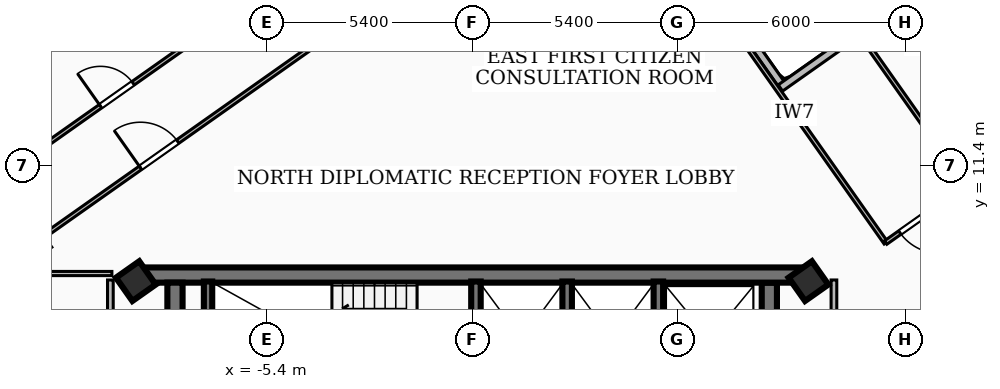
"""IFC4 building model, lengths in metres.
Left out: names, types, materials, properties, quantities, classifications, styles, units other than length and angle.
Written with IfcOpenShell. Run it as: python <this file> out.ifc"""

import sys

from ifc_helpers import new_model, si_unit, direction, frame, frame_2d, origin, origin_2d, place, context, subcontext, project, spatial, rectangle, extrude, element, fill, save


model = new_model("IFC4")
c1 = context("Model", 3, precision=1e-05, world=origin(), true_north=direction((0.0, 1.0)))
c2 = subcontext(c1, "Body", "Model", "MODEL_VIEW")
j1 = project(units=[si_unit("LENGTHUNIT", "METRE"), si_unit("PLANEANGLEUNIT", "RADIAN")], contexts=[c1])
p1 = place(None, origin())
s1 = spatial("IfcSite", under=j1, at=p1, CompositionType="ELEMENT")
p2 = place(p1, origin())
s2 = spatial("IfcBuilding", under=s1, at=p2, CompositionType="ELEMENT")
p3 = place(p2, frame((0.0, 0.0, 222.3)))
s3 = spatial("IfcBuildingStorey", under=s2, at=p3, CompositionType="ELEMENT", Elevation=222.3)
p4 = place(p3, frame((-8.78, 8.51, 0.0), z_axis=(0.0, 0.0, 1.0), x_axis=(1.0, 0.0, 0.0)))
e1 = element("IfcWall", 1, at=p4, inside=s3, PredefinedType="SHEAR", context=c2, shape_type="SweptSolid", body=[
    extrude(rectangle(XDim=17.56, YDim=0.4, at=frame_2d((8.78, 0.0))), origin(), (0.0, 0.0, 1.0), 3.14),
])
for number, where, z_axis, x_axis in (
    (2, (-7.82, 1.95, 0.0), (0.0, 0.0, 1.0), (0.0, 1.0, 0.0)),
    (3, (7.82, 8.31, 0.0), (0.0, 0.0, 1.0), (0.0, -1.0, 0.0)),
):
    element("IfcWall", number, at=place(p3, frame(where, z_axis=z_axis, x_axis=x_axis)), inside=s3, PredefinedType="SHEAR", context=c2, shape_type="SweptSolid", body=[
        extrude(rectangle(XDim=6.36, YDim=0.4, at=frame_2d((3.18, 0.0))), origin(), (0.0, 0.0, 1.0), 3.14),
    ])
p5 = place(p3, frame((-6.95, 5.28, 0.0), z_axis=(0.0, 0.0, 1.0), x_axis=(0.0, 1.0, 0.0)))
e4 = element("IfcWall", 4, at=p5, inside=s3, PredefinedType="SOLIDWALL", context=c2, shape_type="SweptSolid", body=[
    extrude(rectangle(XDim=3.06, YDim=0.22, at=frame_2d((1.53, 0.0))), origin(), (0.0, 0.0, 1.0), 3.14),
])
for number, where, z_axis, x_axis in (
    (5, (0.1, 5.3, 0.0), (0.0, 0.0, 1.0), (0.0, 1.0, 0.0)),
    (6, (2.5, 5.3, 0.0), (0.0, 0.0, 1.0), (0.0, 1.0, 0.0)),
    (7, (4.9, 5.3, 0.0), (0.0, 0.0, 1.0), (0.0, 1.0, 0.0)),
):
    element("IfcWall", number, at=place(p3, frame(where, z_axis=z_axis, x_axis=x_axis)), inside=s3, PredefinedType="SOLIDWALL", context=c2, shape_type="SweptSolid", body=[
        extrude(rectangle(XDim=3.04, YDim=0.25, at=frame_2d((1.52, 0.0))), origin(), (0.0, 0.0, 1.0), 3.14),
    ])
for number, where, z_axis, x_axis in (
    (8, (-8.85, 8.35, 0.0), (0.0, 0.0, 1.0), (0.817, 0.576, 0.0)),
    (9, (8.85, 8.35, 0.0), (0.0, 0.0, 1.0), (0.817, 0.576, 0.0)),
):
    element("IfcColumn", number, at=place(p3, frame(where, z_axis=z_axis, x_axis=x_axis)), inside=s3, PredefinedType="COLUMN", context=c2, shape_type="SweptSolid", body=[
        extrude(rectangle(XDim=0.75, YDim=0.75, at=origin_2d()), origin(), (0.0, 0.0, 1.0), 3.42),
    ])
p6 = place(p3, frame((-15.748, 13.978, 0.0), z_axis=(0.0, 0.0, 1.0), x_axis=(0.817168991675, 0.576398160168, 0.0)))
e10 = element("IfcWall", 10, at=p6, inside=s3, PredefinedType="SOLIDWALL", context=c2, shape_type="SweptSolid", body=[
    extrude(rectangle(XDim=10.022, YDim=0.2, at=frame_2d((5.011, 0.0))), origin(), (0.0, 0.0, 1.0), 3.14),
])
p7 = place(p6, frame((6.618, 0.0, 0.85)))
e11 = element("IfcOpeningElement", 11, at=p7, cuts=e10, PredefinedType="OPENING", context=c2, shape_type="SweptSolid", body=[
    extrude(rectangle(XDim=2.4, YDim=1.85, at=frame_2d((1.2, 0.925))), frame((0.0, 0.11, 0.0), z_axis=(0.0, -1.0, 0.0), x_axis=(1.0, 0.0, 0.0)), (0.0, 0.0, 1.0), 0.22),
])
p8 = place(p3, frame((4.337, 18.921, 0.0), z_axis=(0.0, 0.0, 1.0), x_axis=(0.576400163196, -0.817167578816, 0.0)))
e12 = element("IfcWall", 12, at=p8, inside=s3, PredefinedType="SOLIDWALL", context=c2, shape_type="SweptSolid", body=[
    extrude(rectangle(XDim=6.74, YDim=0.2, at=frame_2d((3.37, 0.0))), origin(), (0.0, 0.0, 1.0), 3.14),
])
p9 = place(p3, frame((8.111, 13.432, 0.0), z_axis=(0.0, 0.0, 1.0), x_axis=(0.81712855258, 0.576455487058, 0.0)))
e13 = element("IfcWall", 13, at=p9, inside=s3, PredefinedType="SOLIDWALL", context=c2, shape_type="SweptSolid", body=[
    extrude(rectangle(XDim=8.841, YDim=0.2, at=frame_2d((4.42, 0.0))), origin(), (0.0, 0.0, 1.0), 3.14),
])
p10 = place(p9, frame((2.85, 0.0, 0.85)))
e14 = element("IfcOpeningElement", 14, at=p10, cuts=e13, PredefinedType="OPENING", context=c2, shape_type="SweptSolid", body=[
    extrude(rectangle(XDim=2.4, YDim=1.85, at=frame_2d((1.2, 0.925))), frame((0.0, 0.11, 0.0), z_axis=(0.0, -1.0, 0.0), x_axis=(1.0, 0.0, 0.0)), (0.0, 0.0, 1.0), 0.22),
])
p11 = place(p3, frame((-9.52, 1.75, 0.0), z_axis=(0.0, 0.0, 1.0), x_axis=(0.0, 1.0, 0.0)))
e15 = element("IfcWall", 15, at=p11, inside=s3, PredefinedType="PARTITIONING", context=c2, shape_type="SweptSolid", body=[
    extrude(rectangle(XDim=6.63, YDim=0.15, at=frame_2d((3.315, 0.0))), origin(), (0.0, 0.0, 1.0), 3.14),
])
p12 = place(p3, frame((9.52, 1.75, 0.0), z_axis=(0.0, 0.0, 1.0), x_axis=(0.0, 1.0, 0.0)))
e16 = element("IfcWall", 16, at=p12, inside=s3, PredefinedType="PARTITIONING", context=c2, shape_type="SweptSolid", body=[
    extrude(rectangle(XDim=6.63, YDim=0.15, at=frame_2d((3.315, 0.0))), origin(), (0.0, 0.0, 1.0), 2.51),
])
p13 = place(p3, frame((-13.662, 8.55, 0.0), z_axis=(0.0, 0.0, 1.0), x_axis=(1.0, 0.0, 0.0)))
e17 = element("IfcWall", 17, at=p13, inside=s3, PredefinedType="PARTITIONING", context=c2, shape_type="SweptSolid", body=[
    extrude(rectangle(XDim=4.182, YDim=0.11, at=frame_2d((2.091, 0.0))), origin(), (0.0, 0.0, 1.0), 2.51),
])
p14 = place(p3, frame((2.338, 13.54, 0.0), z_axis=(0.0, 0.0, 1.0), x_axis=(0.1703339471, 0.9853863945, 0.0)))
e18 = element("IfcWall", 18, at=p14, inside=s3, PredefinedType="PARTITIONING", context=c2, shape_type="SweptSolid", body=[
    extrude(rectangle(XDim=5.954, YDim=0.11, at=frame_2d((2.977, 0.0))), origin(), (0.0, 0.0, 1.0), 3.14),
])
p15 = place(p3, frame((10.887, 9.357, 0.0), z_axis=(0.0, 0.0, 1.0), x_axis=(-0.576423728743, 0.817150956031, 0.0)))
e19 = element("IfcWall", 19, at=p15, inside=s3, PredefinedType="PARTITIONING", context=c2, shape_type="SweptSolid", body=[
    extrude(rectangle(XDim=8.35, YDim=0.11, at=frame_2d((4.175, 0.0))), origin(), (0.0, 0.0, 1.0), 2.51),
])
p16 = place(p3, frame((13.014, 10.869, 0.0), z_axis=(0.0, 0.0, 1.0), x_axis=(-0.817133808286, -0.576448036995, 0.0)))
e20 = element("IfcWall", 20, at=p16, inside=s3, PredefinedType="PARTITIONING", context=c2, shape_type="SweptSolid", body=[
    extrude(rectangle(XDim=2.609, YDim=0.11, at=frame_2d((1.304, 0.0))), origin(), (0.0, 0.0, 1.0), 3.14),
])
p17 = place(p16, frame((0.854, 0.0, 0.0)))
e21 = element("IfcOpeningElement", 21, at=p17, cuts=e20, PredefinedType="OPENING", context=c2, shape_type="SweptSolid", body=[
    extrude(rectangle(XDim=1.3, YDim=2.1, at=frame_2d((0.65, 1.05))), frame((0.0, 0.065, 0.0), z_axis=(0.0, -1.0, 0.0), x_axis=(1.0, 0.0, 0.0)), (0.0, 0.0, 1.0), 0.13),
])
p18 = place(p3, frame((10.215, 14.836, 0.0), z_axis=(0.0, 0.0, 1.0), x_axis=(0.576525296339, -0.817079300118, 0.0)))
e22 = element("IfcWall", 22, at=p18, inside=s3, PredefinedType="PARTITIONING", context=c2, shape_type="SweptSolid", body=[
    extrude(rectangle(XDim=12.87, YDim=0.11, at=frame_2d((6.435, 0.0))), origin(), (0.0, 0.0, 1.0), 2.51),
])
p19 = place(p18, frame((6.155, 0.0, 0.0)))
e23 = element("IfcOpeningElement", 23, at=p19, cuts=e22, PredefinedType="OPENING", context=c2, shape_type="SweptSolid", body=[
    extrude(rectangle(XDim=0.86, YDim=2.04, at=frame_2d((0.43, 1.02))), frame((0.0, 0.065, 0.0), z_axis=(0.0, -1.0, 0.0), x_axis=(1.0, 0.0, 0.0)), (0.0, 0.0, 1.0), 0.13),
])
p20 = place(p18, frame((4.955, 0.0, 0.0)))
e24 = element("IfcOpeningElement", 24, at=p20, cuts=e22, PredefinedType="OPENING", context=c2, shape_type="SweptSolid", body=[
    extrude(rectangle(XDim=0.86, YDim=2.04, at=frame_2d((0.43, 1.02))), frame((0.0, 0.065, 0.0), z_axis=(0.0, -1.0, 0.0), x_axis=(1.0, 0.0, 0.0)), (0.0, 0.0, 1.0), 0.13),
])
p21 = place(p3, frame((-16.752, 5.671, 0.0), z_axis=(0.0, 0.0, 1.0), x_axis=(0.81715881447, 0.576412588285, 0.0)))
e25 = element("IfcWall", 25, at=p21, inside=s3, PredefinedType="PARTITIONING", context=c2, shape_type="SweptSolid", body=[
    extrude(rectangle(XDim=20.44, YDim=0.11, at=frame_2d((10.22, 0.0))), origin(), (0.0, 0.0, 1.0), 2.51),
])
p22 = place(p21, frame((9.82, 0.0, 0.0)))
e26 = element("IfcOpeningElement", 26, at=p22, cuts=e25, PredefinedType="OPENING", context=c2, shape_type="SweptSolid", body=[
    extrude(rectangle(XDim=1.2, YDim=2.1, at=frame_2d((0.6, 1.05))), frame((0.0, 0.065, 0.0), z_axis=(0.0, -1.0, 0.0), x_axis=(1.0, 0.0, 0.0)), (0.0, 0.0, 1.0), 0.13),
])
p23 = place(p3, frame((-14.445, 9.66, 0.0), z_axis=(0.0, 0.0, 1.0), x_axis=(0.817137627016, 0.576442623784, 0.0)))
e27 = element("IfcWall", 27, at=p23, inside=s3, PredefinedType="PARTITIONING", context=c2, shape_type="SweptSolid", body=[
    extrude(rectangle(XDim=12.871, YDim=0.11, at=frame_2d((6.435, 0.0))), origin(), (0.0, 0.0, 1.0), 3.14),
])
p24 = place(p23, frame((5.71, 0.0, 0.0)))
e28 = element("IfcOpeningElement", 28, at=p24, cuts=e27, PredefinedType="OPENING", context=c2, shape_type="SweptSolid", body=[
    extrude(rectangle(XDim=1.05, YDim=2.08, at=frame_2d((0.525, 1.04))), frame((0.0, 0.065, 0.0), z_axis=(0.0, -1.0, 0.0), x_axis=(1.0, 0.0, 0.0)), (0.0, 0.0, 1.0), 0.13),
])
p25 = place(p3, frame((-15.695, 11.433, 0.0), z_axis=(0.0, 0.0, 1.0), x_axis=(0.817121348165, 0.576465699216, 0.0)))
e29 = element("IfcWall", 29, at=p25, inside=s3, PredefinedType="PARTITIONING", context=c2, shape_type="SweptSolid", body=[
    extrude(rectangle(XDim=12.87, YDim=0.11, at=frame_2d((6.435, 0.0))), origin(), (0.0, 0.0, 1.0), 3.14),
])
p26 = place(p25, frame((5.709, 0.0, 0.0)))
e30 = element("IfcOpeningElement", 30, at=p26, cuts=e29, PredefinedType="OPENING", context=c2, shape_type="SweptSolid", body=[
    extrude(rectangle(XDim=1.05, YDim=2.08, at=frame_2d((0.525, 1.04))), frame((0.0, 0.065, 0.0), z_axis=(0.0, -1.0, 0.0), x_axis=(1.0, 0.0, 0.0)), (0.0, 0.0, 1.0), 0.13),
])
p27 = place(p17, origin())
e31 = element("IfcDoor", 31, at=p27, inside=s3, OperationType="SINGLE_SWING_LEFT", PredefinedType="DOOR", context=c2, shape_type="SweptSolid", body=[
    extrude(rectangle(XDim=1.3, YDim=2.1, at=frame_2d((0.65, 1.05))), frame((0.0, 0.025, 0.0), z_axis=(0.0, -1.0, 0.0), x_axis=(1.0, 0.0, 0.0)), (0.0, 0.0, 1.0), 0.05),
])
fill(e21, e31)
p28 = place(p22, origin())
e32 = element("IfcDoor", 32, at=p28, inside=s3, OperationType="SINGLE_SWING_LEFT", PredefinedType="DOOR", context=c2, shape_type="SweptSolid", body=[
    extrude(rectangle(XDim=1.2, YDim=2.1, at=frame_2d((0.6, 1.05))), frame((0.0, 0.025, 0.0), z_axis=(0.0, -1.0, 0.0), x_axis=(1.0, 0.0, 0.0)), (0.0, 0.0, 1.0), 0.05),
])
fill(e26, e32)
p29 = place(p24, origin())
e33 = element("IfcDoor", 33, at=p29, inside=s3, OperationType="SINGLE_SWING_LEFT", PredefinedType="DOOR", context=c2, shape_type="SweptSolid", body=[
    extrude(rectangle(XDim=1.05, YDim=2.08, at=frame_2d((0.525, 1.04))), frame((0.0, 0.025, 0.0), z_axis=(0.0, -1.0, 0.0), x_axis=(1.0, 0.0, 0.0)), (0.0, 0.0, 1.0), 0.05),
])
fill(e28, e33)
save(model, sys.argv[1])
